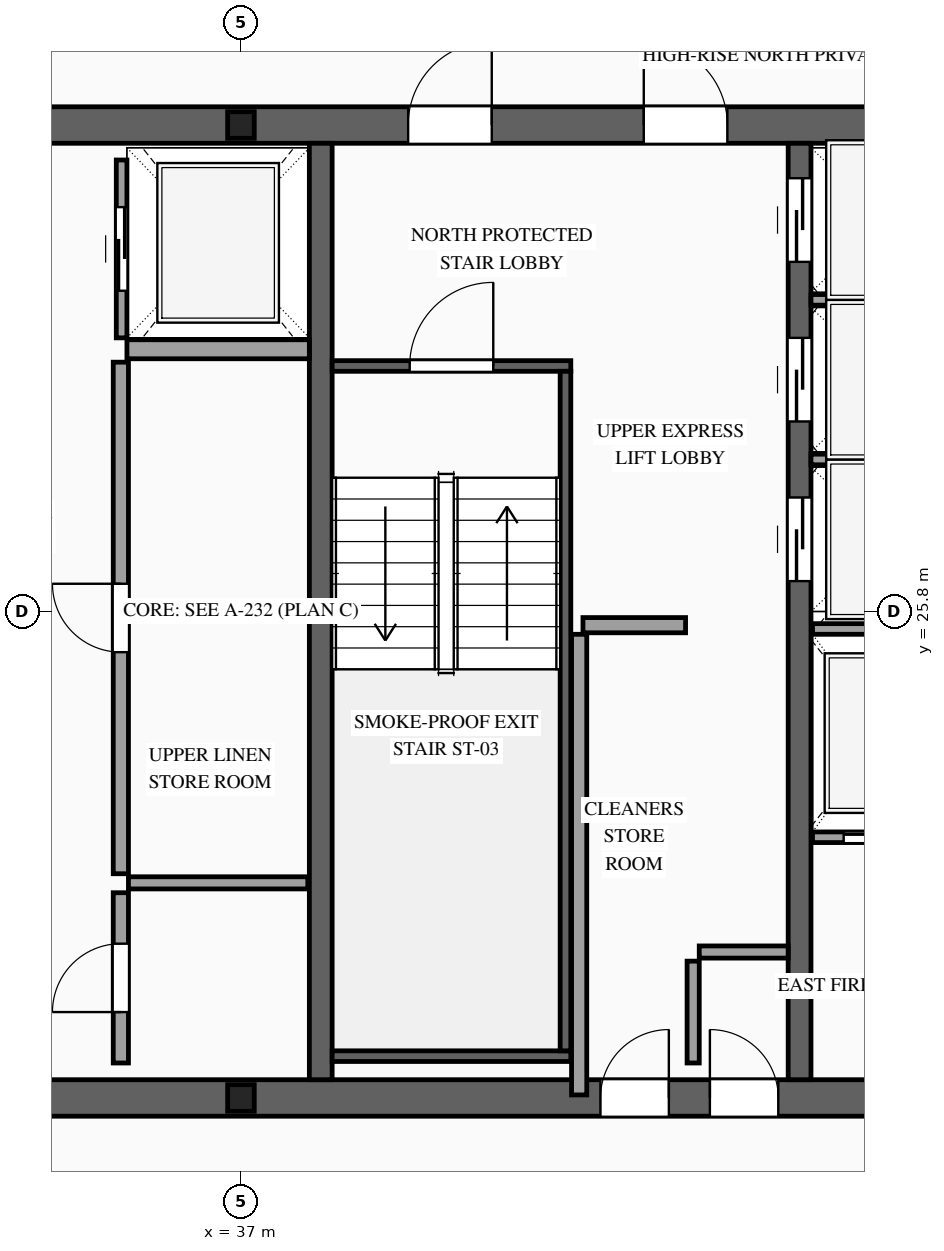
"""IFC4 building model, lengths in metres.
Left out: names, types, materials, properties, quantities, classifications, styles, units other than length and angle.
Written with IfcOpenShell. Run it as: python <this file> out.ifc"""

import sys

from ifc_helpers import new_model, si_unit, direction, frame, frame_2d, origin, origin_2d, place, context, subcontext, project, spatial, rectangle, i_section, extrude, source, transform, mapped, element, fill, save


model = new_model("IFC4")
c1 = context("Model", 3, precision=1e-05, world=origin(), true_north=direction((0.0, 1.0)))
c2 = subcontext(c1, "Body", "Model", "MODEL_VIEW")
j1 = project(units=[si_unit("LENGTHUNIT", "METRE"), si_unit("PLANEANGLEUNIT", "RADIAN")], contexts=[c1])
p1 = place(None, origin())
s1 = spatial("IfcSite", under=j1, at=p1, CompositionType="ELEMENT")
p2 = place(p1, origin())
s2 = spatial("IfcBuilding", under=s1, at=p2, CompositionType="ELEMENT")
p3 = place(p2, frame((0.0, 0.0, 303.1)))
s3 = spatial("IfcBuildingStorey", under=s2, at=p3, CompositionType="ELEMENT", Elevation=303.1)
p4 = place(p3, frame((23.56, 19.4, 0.0), z_axis=(0.0, 0.0, 1.0), x_axis=(1.0, 0.0, 0.0)))
e1 = element("IfcWall", 1, at=p4, inside=s3, PredefinedType="SHEAR", context=c2, shape_type="SweptSolid", body=[
    extrude(rectangle(XDim=26.88, YDim=0.48, at=frame_2d((13.44, 0.0))), origin(), (0.0, 0.0, 1.0), 3.5),
])
p5 = place(p4, frame((1.89, 0.0, 0.0)))
e2 = element("IfcOpeningElement", 2, at=p5, cuts=e1, PredefinedType="OPENING", context=c2, shape_type="SweptSolid", body=[
    extrude(rectangle(XDim=1.1, YDim=2.2, at=frame_2d((0.55, 1.1))), frame((0.0, 0.255, 0.0), z_axis=(0.0, -1.0, 0.0), x_axis=(1.0, 0.0, 0.0)), (0.0, 0.0, 1.0), 0.51),
])
p6 = place(p4, frame((9.79, 0.0, 0.0)))
e3 = element("IfcOpeningElement", 3, at=p6, cuts=e1, PredefinedType="OPENING", context=c2, shape_type="SweptSolid", body=[
    extrude(rectangle(XDim=1.1, YDim=2.2, at=frame_2d((0.55, 1.1))), frame((0.0, 0.255, 0.0), z_axis=(0.0, -1.0, 0.0), x_axis=(1.0, 0.0, 0.0)), (0.0, 0.0, 1.0), 0.51),
])
p7 = place(p4, frame((22.99, 0.0, 0.0)))
e4 = element("IfcOpeningElement", 4, at=p7, cuts=e1, PredefinedType="OPENING", context=c2, shape_type="SweptSolid", body=[
    extrude(rectangle(XDim=1.1, YDim=2.2, at=frame_2d((0.55, 1.1))), frame((0.0, 0.255, 0.0), z_axis=(0.0, -1.0, 0.0), x_axis=(1.0, 0.0, 0.0)), (0.0, 0.0, 1.0), 0.51),
])
p8 = place(p4, frame((19.61, 0.0, 0.0)))
e5 = element("IfcOpeningElement", 5, at=p8, cuts=e1, PredefinedType="OPENING", context=c2, shape_type="SweptSolid", body=[
    extrude(rectangle(XDim=0.9, YDim=2.15, at=frame_2d((0.45, 1.075))), frame((0.0, 0.255, 0.0), z_axis=(0.0, -1.0, 0.0), x_axis=(1.0, 0.0, 0.0)), (0.0, 0.0, 1.0), 0.51),
])
p9 = place(p4, frame((18.17, 0.0, 0.0)))
e6 = element("IfcOpeningElement", 6, at=p9, cuts=e1, PredefinedType="OPENING", context=c2, shape_type="SweptSolid", body=[
    extrude(rectangle(XDim=0.9, YDim=2.15, at=frame_2d((0.45, 1.075))), frame((0.0, 0.255, 0.0), z_axis=(0.0, -1.0, 0.0), x_axis=(1.0, 0.0, 0.0)), (0.0, 0.0, 1.0), 0.51),
])
p10 = place(p3, frame((23.56, 32.2, 0.0), z_axis=(0.0, 0.0, 1.0), x_axis=(1.0, 0.0, 0.0)))
e7 = element("IfcWall", 7, at=p10, inside=s3, PredefinedType="SHEAR", context=c2, shape_type="SweptSolid", body=[
    extrude(rectangle(XDim=26.88, YDim=0.48, at=frame_2d((13.44, 0.0))), origin(), (0.0, 0.0, 1.0), 3.5),
])
p11 = place(p10, frame((4.51, 0.0, 0.0)))
e8 = element("IfcOpeningElement", 8, at=p11, cuts=e7, PredefinedType="OPENING", context=c2, shape_type="SweptSolid", body=[
    extrude(rectangle(XDim=0.9, YDim=2.15, at=frame_2d((0.45, 1.075))), frame((0.0, 0.255, 0.0), z_axis=(0.0, -1.0, 0.0), x_axis=(1.0, 0.0, 0.0)), (0.0, 0.0, 1.0), 0.51),
])
p12 = place(p10, frame((9.79, 0.0, 0.0)))
e9 = element("IfcOpeningElement", 9, at=p12, cuts=e7, PredefinedType="OPENING", context=c2, shape_type="SweptSolid", body=[
    extrude(rectangle(XDim=1.1, YDim=2.2, at=frame_2d((0.55, 1.1))), frame((0.0, 0.255, 0.0), z_axis=(0.0, -1.0, 0.0), x_axis=(1.0, 0.0, 0.0)), (0.0, 0.0, 1.0), 0.51),
])
p13 = place(p10, frame((15.64, 0.0, 0.0)))
e10 = element("IfcOpeningElement", 10, at=p13, cuts=e7, PredefinedType="OPENING", context=c2, shape_type="SweptSolid", body=[
    extrude(rectangle(XDim=1.1, YDim=2.2, at=frame_2d((0.55, 1.1))), frame((0.0, 0.255, 0.0), z_axis=(0.0, -1.0, 0.0), x_axis=(1.0, 0.0, 0.0)), (0.0, 0.0, 1.0), 0.51),
])
p14 = place(p10, frame((18.74, 0.0, 0.0)))
e11 = element("IfcOpeningElement", 11, at=p14, cuts=e7, PredefinedType="OPENING", context=c2, shape_type="SweptSolid", body=[
    extrude(rectangle(XDim=1.1, YDim=2.2, at=frame_2d((0.55, 1.1))), frame((0.0, 0.255, 0.0), z_axis=(0.0, -1.0, 0.0), x_axis=(1.0, 0.0, 0.0)), (0.0, 0.0, 1.0), 0.51),
])
m1 = source(origin(), c2, "Body", "SweptSolid", [
    extrude(rectangle(XDim=12.32, YDim=0.3, at=frame_2d((6.16, 0.0))), origin(), (0.0, 0.0, 1.0), 3.5),
])
p15 = place(p3, frame((38.05, 19.64, 0.0), z_axis=(0.0, 0.0, 1.0), x_axis=(0.0, 1.0, 0.0)))
e12 = element("IfcWall", 12, at=p15, inside=s3, PredefinedType="SOLIDWALL", context=c2, shape_type="MappedRepresentation", body=[
    mapped(m1, transform((0.0, 0.0, 0.0), scale=1.0)),
])
p16 = place(p3, frame((44.35, 19.64, 0.0), z_axis=(0.0, 0.0, 1.0), x_axis=(0.0, 1.0, 0.0)))
e13 = element("IfcWall", 13, at=p16, inside=s3, PredefinedType="SOLIDWALL", context=c2, shape_type="SweptSolid", body=[
    extrude(rectangle(XDim=12.32, YDim=0.3, at=frame_2d((6.16, 0.0))), origin(), (0.0, 0.0, 1.0), 3.5),
])
p17 = place(p16, frame((6.56, 0.0, 0.0)))
e14 = element("IfcOpeningElement", 14, at=p17, cuts=e13, PredefinedType="OPENING", context=c2, shape_type="SweptSolid", body=[
    extrude(rectangle(XDim=1.1, YDim=2.2, at=frame_2d((0.55, 1.1))), frame((0.0, 0.165, 0.0), z_axis=(0.0, -1.0, 0.0), x_axis=(1.0, 0.0, 0.0)), (0.0, 0.0, 1.0), 0.33),
])
p18 = place(p16, frame((8.66, 0.0, 0.0)))
e15 = element("IfcOpeningElement", 15, at=p18, cuts=e13, PredefinedType="OPENING", context=c2, shape_type="SweptSolid", body=[
    extrude(rectangle(XDim=1.1, YDim=2.2, at=frame_2d((0.55, 1.1))), frame((0.0, 0.165, 0.0), z_axis=(0.0, -1.0, 0.0), x_axis=(1.0, 0.0, 0.0)), (0.0, 0.0, 1.0), 0.33),
])
p19 = place(p16, frame((10.76, 0.0, 0.0)))
e16 = element("IfcOpeningElement", 16, at=p19, cuts=e13, PredefinedType="OPENING", context=c2, shape_type="SweptSolid", body=[
    extrude(rectangle(XDim=1.1, YDim=2.2, at=frame_2d((0.55, 1.1))), frame((0.0, 0.165, 0.0), z_axis=(0.0, -1.0, 0.0), x_axis=(1.0, 0.0, 0.0)), (0.0, 0.0, 1.0), 0.33),
])
m2 = source(origin(), c2, "Body", "SweptSolid", [
    extrude(i_section(OverallWidth=0.35, OverallDepth=0.35, WebThickness=0.012, FlangeThickness=0.019, at=origin_2d()), origin(), (0.0, 0.0, 1.0), 3.5),
])
for number, where, z_axis, x_axis in (
    (17, (37.0, 19.4, 0.0), (0.0, 0.0, 1.0), (1.0, 0.0, 0.0)),
    (18, (37.0, 32.2, 0.0), (0.0, 0.0, 1.0), (1.0, 0.0, 0.0)),
):
    element("IfcColumn", number, at=place(p3, frame(where, z_axis=z_axis, x_axis=x_axis)), inside=s3, PredefinedType="COLUMN", context=c2, shape_type="MappedRepresentation", body=[
        mapped(m2, transform((0.0, 0.0, 0.0), scale=1.0)),
    ])
p20 = place(p3, frame((44.52, 22.83, 0.0), z_axis=(0.0, 0.0, 1.0), x_axis=(1.0, 0.0, 0.0)))
e19 = element("IfcWall", 19, at=p20, inside=s3, PredefinedType="SOLIDWALL", context=c2, shape_type="SweptSolid", body=[
    extrude(rectangle(XDim=1.92, YDim=0.14, at=frame_2d((0.96, 0.0))), origin(), (0.0, 0.0, 1.0), 3.22),
])
p21 = place(p20, frame((0.41, 0.0, 0.0)))
e20 = element("IfcOpeningElement", 20, at=p21, cuts=e19, PredefinedType="OPENING", context=c2, shape_type="SweptSolid", body=[
    extrude(rectangle(XDim=1.1, YDim=2.2, at=frame_2d((0.55, 1.1))), frame((0.0, 0.085, 0.0), z_axis=(0.0, -1.0, 0.0), x_axis=(1.0, 0.0, 0.0)), (0.0, 0.0, 1.0), 0.17),
])
m3 = source(origin(), c2, "Body", "SweptSolid", [
    extrude(rectangle(XDim=1.92, YDim=0.14, at=frame_2d((0.96, 0.0))), origin(), (0.0, 0.0, 1.0), 3.22),
])
p22 = place(p3, frame((44.52, 25.57, 0.0), z_axis=(0.0, 0.0, 1.0), x_axis=(1.0, 0.0, 0.0)))
e21 = element("IfcWall", 21, at=p22, inside=s3, PredefinedType="SOLIDWALL", context=c2, shape_type="MappedRepresentation", body=[
    mapped(m3, transform((0.0, 0.0, 0.0), scale=1.0)),
])
p23 = place(p3, frame((35.43, 29.4, 0.0), z_axis=(0.0, 0.0, 1.0), x_axis=(0.0, 1.0, 0.0)))
e22 = element("IfcWall", 22, at=p23, inside=s3, PredefinedType="SOLIDWALL", context=c2, shape_type="SweptSolid", body=[
    extrude(rectangle(XDim=2.34, YDim=0.14, at=frame_2d((1.17, 0.0))), origin(), (0.0, 0.0, 1.0), 3.22),
])
p24 = place(p23, frame((0.62, 0.0, 0.0)))
e23 = element("IfcOpeningElement", 23, at=p24, cuts=e22, PredefinedType="OPENING", context=c2, shape_type="SweptSolid", body=[
    extrude(rectangle(XDim=1.1, YDim=2.2, at=frame_2d((0.55, 1.1))), frame((0.0, 0.085, 0.0), z_axis=(0.0, -1.0, 0.0), x_axis=(1.0, 0.0, 0.0)), (0.0, 0.0, 1.0), 0.17),
])
m4 = source(origin(), c2, "Body", "SweptSolid", [
    extrude(rectangle(XDim=2.4, YDim=0.25, at=frame_2d((1.2, 0.0))), origin(), (0.0, 0.0, 1.0), 3.22),
])
p25 = place(p3, frame((35.5, 29.25, 0.0), z_axis=(0.0, 0.0, 1.0), x_axis=(1.0, 0.0, 0.0)))
e24 = element("IfcWall", 24, at=p25, inside=s3, PredefinedType="SOLIDWALL", context=c2, shape_type="MappedRepresentation", body=[
    mapped(m4, transform((0.0, 0.0, 0.0), scale=1.0)),
])
m5 = source(origin(), c2, "Body", "SweptSolid", [
    extrude(rectangle(XDim=2.0, YDim=0.14, at=frame_2d((1.0, 0.0))), origin(), (0.0, 0.0, 1.0), 3.22),
])
for number, where, z_axis, x_axis in (
    (25, (44.5, 27.8, 0.0), (0.0, 0.0, 1.0), (1.0, 0.0, 0.0)),
    (26, (44.5, 29.9, 0.0), (0.0, 0.0, 1.0), (1.0, 0.0, 0.0)),
):
    element("IfcWall", number, at=place(p3, frame(where, z_axis=z_axis, x_axis=x_axis)), inside=s3, PredefinedType="SOLIDWALL", context=c2, shape_type="MappedRepresentation", body=[
        mapped(m5, transform((0.0, 0.0, 0.0), scale=1.0)),
    ])
p26 = place(p3, frame((38.2, 29.03, 0.0), z_axis=(0.0, 0.0, 1.0), x_axis=(1.0, 0.0, 0.0)))
e27 = element("IfcWall", 27, at=p26, inside=s3, PredefinedType="SOLIDWALL", context=c2, shape_type="SweptSolid", body=[
    extrude(rectangle(XDim=3.14, YDim=0.14, at=frame_2d((1.57, 0.0))), origin(), (0.0, 0.0, 1.0), 3.22),
])
p27 = place(p26, frame((1.02, 0.0, 0.0)))
e28 = element("IfcOpeningElement", 28, at=p27, cuts=e27, PredefinedType="OPENING", context=c2, shape_type="SweptSolid", body=[
    extrude(rectangle(XDim=1.1, YDim=2.2, at=frame_2d((0.55, 1.1))), frame((0.0, 0.085, 0.0), z_axis=(0.0, -1.0, 0.0), x_axis=(1.0, 0.0, 0.0)), (0.0, 0.0, 1.0), 0.17),
])
m6 = source(origin(), c2, "Body", "SweptSolid", [
    extrude(rectangle(XDim=3.14, YDim=0.14, at=frame_2d((1.57, 0.0))), origin(), (0.0, 0.0, 1.0), 3.22),
])
p28 = place(p3, frame((38.2, 19.95, 0.0), z_axis=(0.0, 0.0, 1.0), x_axis=(1.0, 0.0, 0.0)))
e29 = element("IfcWall", 29, at=p28, inside=s3, PredefinedType="SOLIDWALL", context=c2, shape_type="MappedRepresentation", body=[
    mapped(m6, transform((0.0, 0.0, 0.0), scale=1.0)),
])
m7 = source(origin(), c2, "Body", "SweptSolid", [
    extrude(rectangle(XDim=8.94, YDim=0.14, at=frame_2d((4.47, 0.0))), origin(), (0.0, 0.0, 1.0), 3.22),
])
p29 = place(p3, frame((41.27, 20.02, 0.0), z_axis=(0.0, 0.0, 1.0), x_axis=(0.0, 1.0, 0.0)))
e30 = element("IfcWall", 30, at=p29, inside=s3, PredefinedType="SOLIDWALL", context=c2, shape_type="MappedRepresentation", body=[
    mapped(m7, transform((0.0, 0.0, 0.0), scale=1.0)),
])
p30 = place(p3, frame((35.42, 19.86, 0.0), z_axis=(0.0, 0.0, 1.0), x_axis=(0.0, 1.0, 0.0)))
e31 = element("IfcWall", 31, at=p30, inside=s3, PredefinedType="PARTITIONING", context=c2, shape_type="SweptSolid", body=[
    extrude(rectangle(XDim=2.24, YDim=0.2, at=frame_2d((1.12, 0.0))), origin(), (0.0, 0.0, 1.0), 3.22),
])
p31 = place(p30, frame((0.67, 0.0, 0.0)))
e32 = element("IfcOpeningElement", 32, at=p31, cuts=e31, PredefinedType="OPENING", context=c2, shape_type="SweptSolid", body=[
    extrude(rectangle(XDim=0.9, YDim=2.15, at=frame_2d((0.45, 1.075))), frame((0.0, 0.115, 0.0), z_axis=(0.0, -1.0, 0.0), x_axis=(1.0, 0.0, 0.0)), (0.0, 0.0, 1.0), 0.23),
])
p32 = place(p3, frame((35.42, 22.35, 0.0), z_axis=(0.0, 0.0, 1.0), x_axis=(0.0, 1.0, 0.0)))
e33 = element("IfcWall", 33, at=p32, inside=s3, PredefinedType="PARTITIONING", context=c2, shape_type="SweptSolid", body=[
    extrude(rectangle(XDim=6.73, YDim=0.2, at=frame_2d((3.365, 0.0))), origin(), (0.0, 0.0, 1.0), 3.22),
])
p33 = place(p32, frame((2.915, 0.0, 0.0)))
e34 = element("IfcOpeningElement", 34, at=p33, cuts=e33, PredefinedType="OPENING", context=c2, shape_type="SweptSolid", body=[
    extrude(rectangle(XDim=0.9, YDim=2.15, at=frame_2d((0.45, 1.075))), frame((0.0, 0.115, 0.0), z_axis=(0.0, -1.0, 0.0), x_axis=(1.0, 0.0, 0.0)), (0.0, 0.0, 1.0), 0.23),
])
m8 = source(origin(), c2, "Body", "SweptSolid", [
    extrude(rectangle(XDim=2.36, YDim=0.16, at=frame_2d((1.18, 0.0))), origin(), (0.0, 0.0, 1.0), 3.22),
])
p34 = place(p3, frame((35.52, 22.23, 0.0), z_axis=(0.0, 0.0, 1.0), x_axis=(1.0, 0.0, 0.0)))
e35 = element("IfcWall", 35, at=p34, inside=s3, PredefinedType="PARTITIONING", context=c2, shape_type="MappedRepresentation", body=[
    mapped(m8, transform((0.0, 0.0, 0.0), scale=1.0)),
])
m9 = source(origin(), c2, "Body", "SweptSolid", [
    extrude(rectangle(XDim=1.34, YDim=0.16, at=frame_2d((0.67, 0.0))), origin(), (0.0, 0.0, 1.0), 3.22),
])
p35 = place(p3, frame((42.95, 19.86, 0.0), z_axis=(0.0, 0.0, 1.0), x_axis=(0.0, 1.0, 0.0)))
e36 = element("IfcWall", 36, at=p35, inside=s3, PredefinedType="PARTITIONING", context=c2, shape_type="MappedRepresentation", body=[
    mapped(m9, transform((0.0, 0.0, 0.0), scale=1.0)),
])
m10 = source(origin(), c2, "Body", "SweptSolid", [
    extrude(rectangle(XDim=1.17, YDim=0.16, at=frame_2d((0.585, 0.0))), origin(), (0.0, 0.0, 1.0), 3.22),
])
p36 = place(p3, frame((43.03, 21.32, 0.0), z_axis=(0.0, 0.0, 1.0), x_axis=(1.0, 0.0, 0.0)))
e37 = element("IfcWall", 37, at=p36, inside=s3, PredefinedType="PARTITIONING", context=c2, shape_type="MappedRepresentation", body=[
    mapped(m10, transform((0.0, 0.0, 0.0), scale=1.0)),
])
m11 = source(origin(), c2, "Body", "SweptSolid", [
    extrude(rectangle(XDim=6.06, YDim=0.2, at=frame_2d((3.03, 0.0))), origin(), (0.0, 0.0, 1.0), 3.22),
])
p37 = place(p3, frame((41.45, 19.44, 0.0), z_axis=(0.0, 0.0, 1.0), x_axis=(0.0, 1.0, 0.0)))
e38 = element("IfcWall", 38, at=p37, inside=s3, PredefinedType="PARTITIONING", context=c2, shape_type="MappedRepresentation", body=[
    mapped(m11, transform((0.0, 0.0, 0.0), scale=1.0)),
])
m12 = source(origin(), c2, "Body", "SweptSolid", [
    extrude(rectangle(XDim=1.35, YDim=0.2, at=frame_2d((0.675, 0.0))), origin(), (0.0, 0.0, 1.0), 3.22),
])
p38 = place(p3, frame((41.5, 25.62, 0.0), z_axis=(0.0, 0.0, 1.0), x_axis=(1.0, 0.0, 0.0)))
e39 = element("IfcWall", 39, at=p38, inside=s3, PredefinedType="PARTITIONING", context=c2, shape_type="MappedRepresentation", body=[
    mapped(m12, transform((0.0, 0.0, 0.0), scale=1.0)),
])
m13 = source(origin(), c2, "Body", "SweptSolid", [
    extrude(rectangle(XDim=1.1, YDim=2.2, at=frame_2d((0.55, 1.1))), frame((0.0, 0.025, 0.0), z_axis=(0.0, -1.0, 0.0), x_axis=(1.0, 0.0, 0.0)), (0.0, 0.0, 1.0), 0.05),
])
p39 = place(p21, origin())
e40 = element("IfcDoor", 40, at=p39, inside=s3, OperationType="SLIDING_TO_RIGHT", PredefinedType="DOOR", context=c2, shape_type="MappedRepresentation", body=[
    mapped(m13, transform((0.0, 0.0, 0.0), scale=1.0)),
])
fill(e20, e40)
p40 = place(p24, origin())
e41 = element("IfcDoor", 41, at=p40, inside=s3, OperationType="SLIDING_TO_RIGHT", PredefinedType="DOOR", context=c2, shape_type="MappedRepresentation", body=[
    mapped(m13, transform((0.0, 0.0, 0.0), scale=1.0)),
])
fill(e23, e41)
p41 = place(p17, origin())
e42 = element("IfcDoor", 42, at=p41, inside=s3, OperationType="SLIDING_TO_LEFT", PredefinedType="DOOR", context=c2, shape_type="MappedRepresentation", body=[
    mapped(m13, transform((0.0, 0.0, 0.0), scale=1.0)),
])
fill(e14, e42)
p42 = place(p18, origin())
e43 = element("IfcDoor", 43, at=p42, inside=s3, OperationType="SLIDING_TO_RIGHT", PredefinedType="DOOR", context=c2, shape_type="MappedRepresentation", body=[
    mapped(m13, transform((0.0, 0.0, 0.0), scale=1.0)),
])
fill(e15, e43)
p43 = place(p19, origin())
e44 = element("IfcDoor", 44, at=p43, inside=s3, OperationType="SLIDING_TO_LEFT", PredefinedType="DOOR", context=c2, shape_type="MappedRepresentation", body=[
    mapped(m13, transform((0.0, 0.0, 0.0), scale=1.0)),
])
fill(e16, e44)
m14 = source(origin(), c2, "Body", "SweptSolid", [
    extrude(rectangle(XDim=1.1, YDim=2.2, at=frame_2d((0.55, 1.1))), frame((0.0, 0.025, 0.0), z_axis=(0.0, -1.0, 0.0), x_axis=(1.0, 0.0, 0.0)), (0.0, 0.0, 1.0), 0.05),
])
p44 = place(p27, origin())
e45 = element("IfcDoor", 45, at=p44, inside=s3, OperationType="SINGLE_SWING_RIGHT", PredefinedType="DOOR", context=c2, shape_type="MappedRepresentation", body=[
    mapped(m14, transform((0.0, 0.0, 0.0), scale=1.0)),
])
fill(e28, e45)
p45 = place(p13, origin())
e46 = element("IfcDoor", 46, at=p45, inside=s3, OperationType="SINGLE_SWING_RIGHT", PredefinedType="DOOR", context=c2, shape_type="MappedRepresentation", body=[
    mapped(m14, transform((0.0, 0.0, 0.0), scale=1.0)),
])
fill(e10, e46)
p46 = place(p14, origin())
e47 = element("IfcDoor", 47, at=p46, inside=s3, OperationType="SINGLE_SWING_LEFT", PredefinedType="DOOR", context=c2, shape_type="MappedRepresentation", body=[
    mapped(m14, transform((0.0, 0.0, 0.0), scale=1.0)),
])
fill(e11, e47)
m15 = source(origin(), c2, "Body", "SweptSolid", [
    extrude(rectangle(XDim=0.9, YDim=2.15, at=frame_2d((0.45, 1.075))), frame((0.0, 0.025, 0.0), z_axis=(0.0, -1.0, 0.0), x_axis=(1.0, 0.0, 0.0)), (0.0, 0.0, 1.0), 0.05),
])
p47 = place(p31, origin())
e48 = element("IfcDoor", 48, at=p47, inside=s3, OperationType="SINGLE_SWING_LEFT", PredefinedType="DOOR", context=c2, shape_type="MappedRepresentation", body=[
    mapped(m15, transform((0.0, 0.0, 0.0), scale=1.0)),
])
fill(e32, e48)
p48 = place(p33, origin())
e49 = element("IfcDoor", 49, at=p48, inside=s3, OperationType="SINGLE_SWING_RIGHT", PredefinedType="DOOR", context=c2, shape_type="MappedRepresentation", body=[
    mapped(m15, transform((0.0, 0.0, 0.0), scale=1.0)),
])
fill(e34, e49)
p49 = place(p8, origin())
e50 = element("IfcDoor", 50, at=p49, inside=s3, OperationType="SINGLE_SWING_LEFT", PredefinedType="DOOR", context=c2, shape_type="MappedRepresentation", body=[
    mapped(m15, transform((0.0, 0.0, 0.0), scale=1.0)),
])
fill(e5, e50)
p50 = place(p9, origin())
e51 = element("IfcDoor", 51, at=p50, inside=s3, OperationType="SINGLE_SWING_RIGHT", PredefinedType="DOOR", context=c2, shape_type="MappedRepresentation", body=[
    mapped(m15, transform((0.0, 0.0, 0.0), scale=1.0)),
])
fill(e6, e51)
save(model, sys.argv[1])
